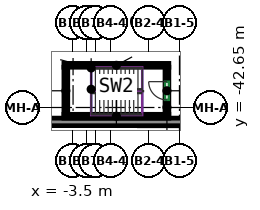
"""IFC4 building model, lengths in metres.
Left out: names, types, materials, properties, quantities, classifications, styles, units other than length and angle.
Written with IfcOpenShell. Run it as: python <this file> out.ifc"""

import sys

from ifc_helpers import new_model, si_unit, direction, frame, frame_2d, origin, place, context, subcontext, project, spatial, rectangle, extrude, source, transform, mapped, element, fill, save


model = new_model("IFC4")
c1 = context("Model", 3, precision=1e-05, world=origin(), true_north=direction((0.0, 1.0)))
c2 = subcontext(c1, "Body", "Model", "MODEL_VIEW")
j1 = project(units=[si_unit("LENGTHUNIT", "METRE"), si_unit("PLANEANGLEUNIT", "RADIAN")], contexts=[c1])
p1 = place(None, origin())
s1 = spatial("IfcSite", under=j1, at=p1, CompositionType="ELEMENT")
p2 = place(p1, origin())
s2 = spatial("IfcBuilding", under=s1, at=p2, CompositionType="ELEMENT")
p3 = place(p2, frame((0.0, 0.0, -4.5)))
s3 = spatial("IfcBuildingStorey", under=s2, at=p3, CompositionType="ELEMENT", Elevation=-4.5)
m1 = source(origin(), c2, "Body", "SweptSolid", [
    extrude(rectangle(XDim=89.85, YDim=0.5, at=frame_2d((44.925, 0.0))), origin(), (0.0, 0.0, 1.0), 4.5),
])
p4 = place(p3, frame((-57.15, -43.6, 0.0), z_axis=(0.0, 0.0, 1.0), x_axis=(1.0, 0.0, 0.0)))
e1 = element("IfcWall", 1, at=p4, inside=s3, PredefinedType="SOLIDWALL", context=c2, shape_type="MappedRepresentation", body=[
    mapped(m1, transform((0.0, 0.0, 0.0))),
])
m2 = source(origin(), c2, "Body", "SweptSolid", [
    extrude(rectangle(XDim=6.9, YDim=0.25, at=frame_2d((3.45, 0.0))), origin(), (0.0, 0.0, 1.0), 4.09),
])
for number, where, z_axis, x_axis in (
    (2, (-4.1, -43.225, 0.0), (0.0, 0.0, 1.0), (1.0, 0.0, 0.0)),
    (3, (-4.1, -39.875, 0.0), (0.0, 0.0, 1.0), (1.0, 0.0, 0.0)),
):
    element("IfcWall", number, at=place(p3, frame(where, z_axis=z_axis, x_axis=x_axis)), inside=s3, PredefinedType="SHEAR", context=c2, shape_type="MappedRepresentation", body=[
        mapped(m2, transform((0.0, 0.0, 0.0))),
    ])
m3 = source(origin(), c2, "Body", "SweptSolid", [
    extrude(rectangle(XDim=3.1, YDim=0.25, at=frame_2d((1.55, 0.0))), origin(), (0.0, 0.0, 1.0), 4.09),
])
p5 = place(p3, frame((-3.975, -43.1, 0.0), z_axis=(0.0, 0.0, 1.0), x_axis=(0.0, 1.0, 0.0)))
e4 = element("IfcWall", 4, at=p5, inside=s3, PredefinedType="SHEAR", context=c2, shape_type="MappedRepresentation", body=[
    mapped(m3, transform((0.0, 0.0, 0.0))),
])
p6 = place(p3, frame((2.675, -43.1, 0.0), z_axis=(0.0, 0.0, 1.0), x_axis=(0.0, 1.0, 0.0)))
e5 = element("IfcWall", 5, at=p6, inside=s3, PredefinedType="SHEAR", context=c2, shape_type="MappedRepresentation", body=[
    mapped(m3, transform((0.0, 0.0, 0.0))),
])
p7 = place(p6, frame((0.95, 0.0, 0.0)))
e6 = element("IfcOpeningElement", 6, at=p7, cuts=e5, PredefinedType="OPENING", context=c2, shape_type="SweptSolid", body=[
    extrude(rectangle(XDim=1.2, YDim=2.1, at=frame_2d((0.6, 1.05))), frame((0.0, 0.135, 0.0), z_axis=(0.0, -1.0, 0.0), x_axis=(1.0, 0.0, 0.0)), (0.0, 0.0, 1.0), 0.27),
])
p8 = place(p7, origin())
e7 = element("IfcDoor", 7, at=p8, inside=s3, OperationType="SINGLE_SWING_RIGHT", PredefinedType="DOOR", context=c2, shape_type="SweptSolid", body=[
    extrude(rectangle(XDim=1.2, YDim=2.1, at=frame_2d((0.6, 1.05))), frame((0.0, 0.025, 0.0), z_axis=(0.0, -1.0, 0.0), x_axis=(1.0, 0.0, 0.0)), (0.0, 0.0, 1.0), 0.05),
])
fill(e6, e7)
save(model, sys.argv[1])
